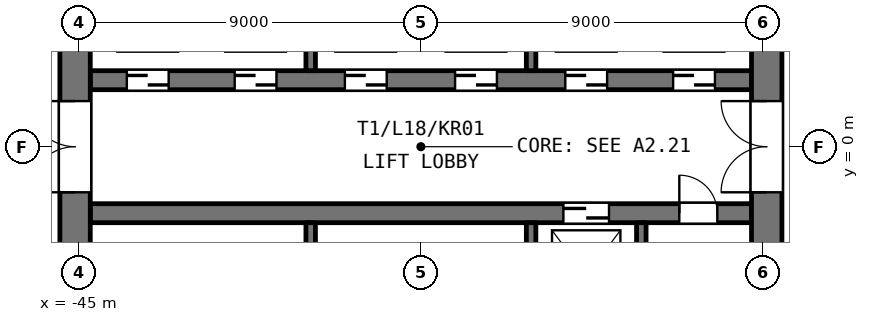
"""IFC4 building model, lengths in metres.
Left out: names, types, materials, properties, quantities, classifications, styles, units other than length and angle.
Written with IfcOpenShell. Run it as: python <this file> out.ifc"""

import sys

from ifc_helpers import new_model, si_unit, direction, frame, frame_2d, origin, place, context, subcontext, project, spatial, rectangle, extrude, element, fill, save


model = new_model("IFC4")
c1 = context("Model", 3, precision=1e-05, world=origin(), true_north=direction((0.0, 1.0)))
c2 = subcontext(c1, "Body", "Model", "MODEL_VIEW")
j1 = project(units=[si_unit("LENGTHUNIT", "METRE"), si_unit("PLANEANGLEUNIT", "RADIAN")], contexts=[c1])
p1 = place(None, origin())
s1 = spatial("IfcSite", under=j1, at=p1, CompositionType="ELEMENT")
p2 = place(p1, origin())
s2 = spatial("IfcBuilding", under=s1, at=p2, CompositionType="ELEMENT")
p3 = place(p2, frame((0.0, 0.0, 80.1)))
s3 = spatial("IfcBuildingStorey", under=s2, at=p3, CompositionType="ELEMENT", Elevation=80.1)
p4 = place(p3, frame((-44.7, -1.75, 0.0), z_axis=(0.0, 0.0, 1.0), x_axis=(1.0, 0.0, 0.0)))
e1 = element("IfcWall", 1, at=p4, inside=s3, PredefinedType="SHEAR", context=c2, shape_type="SweptSolid", body=[
    extrude(rectangle(XDim=17.4, YDim=0.5, at=frame_2d((8.7, 0.0))), origin(), (0.0, 0.0, 1.0), 3.6),
])
p5 = place(p4, frame((12.45, 0.0, 0.0)))
e2 = element("IfcOpeningElement", 2, at=p5, cuts=e1, PredefinedType="OPENING", context=c2, shape_type="SweptSolid", body=[
    extrude(rectangle(XDim=1.2, YDim=2.1, at=frame_2d((0.6, 1.05))), frame((0.0, 0.26, 0.0), z_axis=(0.0, -1.0, 0.0), x_axis=(1.0, 0.0, 0.0)), (0.0, 0.0, 1.0), 0.52),
])
p6 = place(p4, frame((15.5, 0.0, 0.0)))
e3 = element("IfcOpeningElement", 3, at=p6, cuts=e1, PredefinedType="OPENING", context=c2, shape_type="SweptSolid", body=[
    extrude(rectangle(XDim=1.0, YDim=2.1, at=frame_2d((0.5, 1.05))), frame((0.0, 0.26, 0.0), z_axis=(0.0, -1.0, 0.0), x_axis=(1.0, 0.0, 0.0)), (0.0, 0.0, 1.0), 0.52),
])
p7 = place(p3, frame((-44.7, 1.75, 0.0), z_axis=(0.0, 0.0, 1.0), x_axis=(1.0, 0.0, 0.0)))
e4 = element("IfcWall", 4, at=p7, inside=s3, PredefinedType="SHEAR", context=c2, shape_type="SweptSolid", body=[
    extrude(rectangle(XDim=17.4, YDim=0.5, at=frame_2d((8.7, 0.0))), origin(), (0.0, 0.0, 1.0), 3.6),
])
p8 = place(p7, frame((0.962, 0.0, 0.0)))
e5 = element("IfcOpeningElement", 5, at=p8, cuts=e4, PredefinedType="OPENING", context=c2, shape_type="SweptSolid", body=[
    extrude(rectangle(XDim=1.1, YDim=2.1, at=frame_2d((0.55, 1.05))), frame((0.0, 0.26, 0.0), z_axis=(0.0, -1.0, 0.0), x_axis=(1.0, 0.0, 0.0)), (0.0, 0.0, 1.0), 0.52),
])
p9 = place(p7, frame((3.8, 0.0, 0.0)))
e6 = element("IfcOpeningElement", 6, at=p9, cuts=e4, PredefinedType="OPENING", context=c2, shape_type="SweptSolid", body=[
    extrude(rectangle(XDim=1.1, YDim=2.1, at=frame_2d((0.55, 1.05))), frame((0.0, 0.26, 0.0), z_axis=(0.0, -1.0, 0.0), x_axis=(1.0, 0.0, 0.0)), (0.0, 0.0, 1.0), 0.52),
])
p10 = place(p7, frame((6.7, 0.0, 0.0)))
e7 = element("IfcOpeningElement", 7, at=p10, cuts=e4, PredefinedType="OPENING", context=c2, shape_type="SweptSolid", body=[
    extrude(rectangle(XDim=1.1, YDim=2.1, at=frame_2d((0.55, 1.05))), frame((0.0, 0.26, 0.0), z_axis=(0.0, -1.0, 0.0), x_axis=(1.0, 0.0, 0.0)), (0.0, 0.0, 1.0), 0.52),
])
p11 = place(p7, frame((9.6, 0.0, 0.0)))
e8 = element("IfcOpeningElement", 8, at=p11, cuts=e4, PredefinedType="OPENING", context=c2, shape_type="SweptSolid", body=[
    extrude(rectangle(XDim=1.1, YDim=2.1, at=frame_2d((0.55, 1.05))), frame((0.0, 0.26, 0.0), z_axis=(0.0, -1.0, 0.0), x_axis=(1.0, 0.0, 0.0)), (0.0, 0.0, 1.0), 0.52),
])
p12 = place(p7, frame((12.5, 0.0, 0.0)))
e9 = element("IfcOpeningElement", 9, at=p12, cuts=e4, PredefinedType="OPENING", context=c2, shape_type="SweptSolid", body=[
    extrude(rectangle(XDim=1.1, YDim=2.1, at=frame_2d((0.55, 1.05))), frame((0.0, 0.26, 0.0), z_axis=(0.0, -1.0, 0.0), x_axis=(1.0, 0.0, 0.0)), (0.0, 0.0, 1.0), 0.52),
])
p13 = place(p7, frame((15.337, 0.0, 0.0)))
e10 = element("IfcOpeningElement", 10, at=p13, cuts=e4, PredefinedType="OPENING", context=c2, shape_type="SweptSolid", body=[
    extrude(rectangle(XDim=1.1, YDim=2.1, at=frame_2d((0.55, 1.05))), frame((0.0, 0.26, 0.0), z_axis=(0.0, -1.0, 0.0), x_axis=(1.0, 0.0, 0.0)), (0.0, 0.0, 1.0), 0.52),
])
p14 = place(p3, frame((-45.1, -9.5, 0.0), z_axis=(0.0, 0.0, 1.0), x_axis=(0.0, 1.0, 0.0)))
e11 = element("IfcWall", 11, at=p14, inside=s3, PredefinedType="SHEAR", context=c2, shape_type="SweptSolid", body=[
    extrude(rectangle(XDim=19.0, YDim=0.8, at=frame_2d((9.5, 0.0))), origin(), (0.0, 0.0, 1.0), 3.6),
])
p15 = place(p14, frame((8.3, 0.0, 0.0)))
e12 = element("IfcOpeningElement", 12, at=p15, cuts=e11, PredefinedType="OPENING", context=c2, shape_type="SweptSolid", body=[
    extrude(rectangle(XDim=2.4, YDim=2.1, at=frame_2d((1.2, 1.05))), frame((0.0, 0.41, 0.0), z_axis=(0.0, -1.0, 0.0), x_axis=(1.0, 0.0, 0.0)), (0.0, 0.0, 1.0), 0.82),
])
for number, where, z_axis, x_axis in (
    (13, (-38.9, -4.625, 0.0), (0.0, 0.0, 1.0), (0.0, 1.0, 0.0)),
    (14, (-38.9, 2.0, 0.0), (0.0, 0.0, 1.0), (0.0, 1.0, 0.0)),
    (15, (-33.1, -4.625, 0.0), (0.0, 0.0, 1.0), (0.0, 1.0, 0.0)),
    (16, (-33.1, 2.0, 0.0), (0.0, 0.0, 1.0), (0.0, 1.0, 0.0)),
    (17, (-30.2, -4.625, 0.0), (0.0, 0.0, 1.0), (0.0, 1.0, 0.0)),
):
    element("IfcWall", number, at=place(p3, frame(where, z_axis=z_axis, x_axis=x_axis)), inside=s3, PredefinedType="SHEAR", context=c2, shape_type="SweptSolid", body=[
        extrude(rectangle(XDim=2.625, YDim=0.25, at=frame_2d((1.312, 0.0))), origin(), (0.0, 0.0, 1.0), 3.6),
    ])
p16 = place(p3, frame((-26.9, -9.5, 0.0), z_axis=(0.0, 0.0, 1.0), x_axis=(0.0, 1.0, 0.0)))
e18 = element("IfcWall", 18, at=p16, inside=s3, PredefinedType="SHEAR", context=c2, shape_type="SweptSolid", body=[
    extrude(rectangle(XDim=19.0, YDim=0.8, at=frame_2d((9.5, 0.0))), origin(), (0.0, 0.0, 1.0), 3.6),
])
p17 = place(p16, frame((8.3, 0.0, 0.0)))
e19 = element("IfcOpeningElement", 19, at=p17, cuts=e18, PredefinedType="OPENING", context=c2, shape_type="SweptSolid", body=[
    extrude(rectangle(XDim=2.4, YDim=2.1, at=frame_2d((1.2, 1.05))), frame((0.0, 0.41, 0.0), z_axis=(0.0, -1.0, 0.0), x_axis=(1.0, 0.0, 0.0)), (0.0, 0.0, 1.0), 0.82),
])
p18 = place(p15, origin())
e20 = element("IfcDoor", 20, at=p18, inside=s3, OperationType="DOUBLE_DOOR_SINGLE_SWING", PredefinedType="DOOR", context=c2, shape_type="SweptSolid", body=[
    extrude(rectangle(XDim=2.4, YDim=2.1, at=frame_2d((1.2, 1.05))), frame((0.0, -0.225, 0.0), z_axis=(0.0, -1.0, 0.0), x_axis=(1.0, 0.0, 0.0)), (0.0, 0.0, 1.0), 0.05),
])
fill(e12, e20)
p19 = place(p17, origin())
e21 = element("IfcDoor", 21, at=p19, inside=s3, OperationType="DOUBLE_DOOR_SINGLE_SWING", PredefinedType="DOOR", context=c2, shape_type="SweptSolid", body=[
    extrude(rectangle(XDim=2.4, YDim=2.1, at=frame_2d((1.2, 1.05))), frame((0.0, 0.275, 0.0), z_axis=(0.0, -1.0, 0.0), x_axis=(1.0, 0.0, 0.0)), (0.0, 0.0, 1.0), 0.05),
])
fill(e19, e21)
p20 = place(p8, origin())
e22 = element("IfcDoor", 22, at=p20, inside=s3, OperationType="SLIDING_TO_LEFT", PredefinedType="DOOR", context=c2, shape_type="SweptSolid", body=[
    extrude(rectangle(XDim=1.1, YDim=2.1, at=frame_2d((0.55, 1.05))), frame((0.0, 0.025, 0.0), z_axis=(0.0, -1.0, 0.0), x_axis=(1.0, 0.0, 0.0)), (0.0, 0.0, 1.0), 0.05),
])
fill(e5, e22)
p21 = place(p9, origin())
e23 = element("IfcDoor", 23, at=p21, inside=s3, OperationType="SLIDING_TO_LEFT", PredefinedType="DOOR", context=c2, shape_type="SweptSolid", body=[
    extrude(rectangle(XDim=1.1, YDim=2.1, at=frame_2d((0.55, 1.05))), frame((0.0, 0.025, 0.0), z_axis=(0.0, -1.0, 0.0), x_axis=(1.0, 0.0, 0.0)), (0.0, 0.0, 1.0), 0.05),
])
fill(e6, e23)
p22 = place(p10, origin())
e24 = element("IfcDoor", 24, at=p22, inside=s3, OperationType="SLIDING_TO_LEFT", PredefinedType="DOOR", context=c2, shape_type="SweptSolid", body=[
    extrude(rectangle(XDim=1.1, YDim=2.1, at=frame_2d((0.55, 1.05))), frame((0.0, 0.025, 0.0), z_axis=(0.0, -1.0, 0.0), x_axis=(1.0, 0.0, 0.0)), (0.0, 0.0, 1.0), 0.05),
])
fill(e7, e24)
p23 = place(p11, origin())
e25 = element("IfcDoor", 25, at=p23, inside=s3, OperationType="SLIDING_TO_LEFT", PredefinedType="DOOR", context=c2, shape_type="SweptSolid", body=[
    extrude(rectangle(XDim=1.1, YDim=2.1, at=frame_2d((0.55, 1.05))), frame((0.0, 0.025, 0.0), z_axis=(0.0, -1.0, 0.0), x_axis=(1.0, 0.0, 0.0)), (0.0, 0.0, 1.0), 0.05),
])
fill(e8, e25)
p24 = place(p12, origin())
e26 = element("IfcDoor", 26, at=p24, inside=s3, OperationType="SLIDING_TO_LEFT", PredefinedType="DOOR", context=c2, shape_type="SweptSolid", body=[
    extrude(rectangle(XDim=1.1, YDim=2.1, at=frame_2d((0.55, 1.05))), frame((0.0, 0.025, 0.0), z_axis=(0.0, -1.0, 0.0), x_axis=(1.0, 0.0, 0.0)), (0.0, 0.0, 1.0), 0.05),
])
fill(e9, e26)
p25 = place(p13, origin())
e27 = element("IfcDoor", 27, at=p25, inside=s3, OperationType="SLIDING_TO_LEFT", PredefinedType="DOOR", context=c2, shape_type="SweptSolid", body=[
    extrude(rectangle(XDim=1.1, YDim=2.1, at=frame_2d((0.55, 1.05))), frame((0.0, 0.025, 0.0), z_axis=(0.0, -1.0, 0.0), x_axis=(1.0, 0.0, 0.0)), (0.0, 0.0, 1.0), 0.05),
])
fill(e10, e27)
p26 = place(p5, origin())
e28 = element("IfcDoor", 28, at=p26, inside=s3, OperationType="SLIDING_TO_LEFT", PredefinedType="DOOR", context=c2, shape_type="SweptSolid", body=[
    extrude(rectangle(XDim=1.2, YDim=2.1, at=frame_2d((0.6, 1.05))), frame((0.0, 0.025, 0.0), z_axis=(0.0, -1.0, 0.0), x_axis=(1.0, 0.0, 0.0)), (0.0, 0.0, 1.0), 0.05),
])
fill(e2, e28)
p27 = place(p6, origin())
e29 = element("IfcDoor", 29, at=p27, inside=s3, OperationType="SINGLE_SWING_LEFT", PredefinedType="DOOR", context=c2, shape_type="SweptSolid", body=[
    extrude(rectangle(XDim=1.0, YDim=2.1, at=frame_2d((0.5, 1.05))), frame((0.0, 0.025, 0.0), z_axis=(0.0, -1.0, 0.0), x_axis=(1.0, 0.0, 0.0)), (0.0, 0.0, 1.0), 0.05),
])
fill(e3, e29)
save(model, sys.argv[1])
